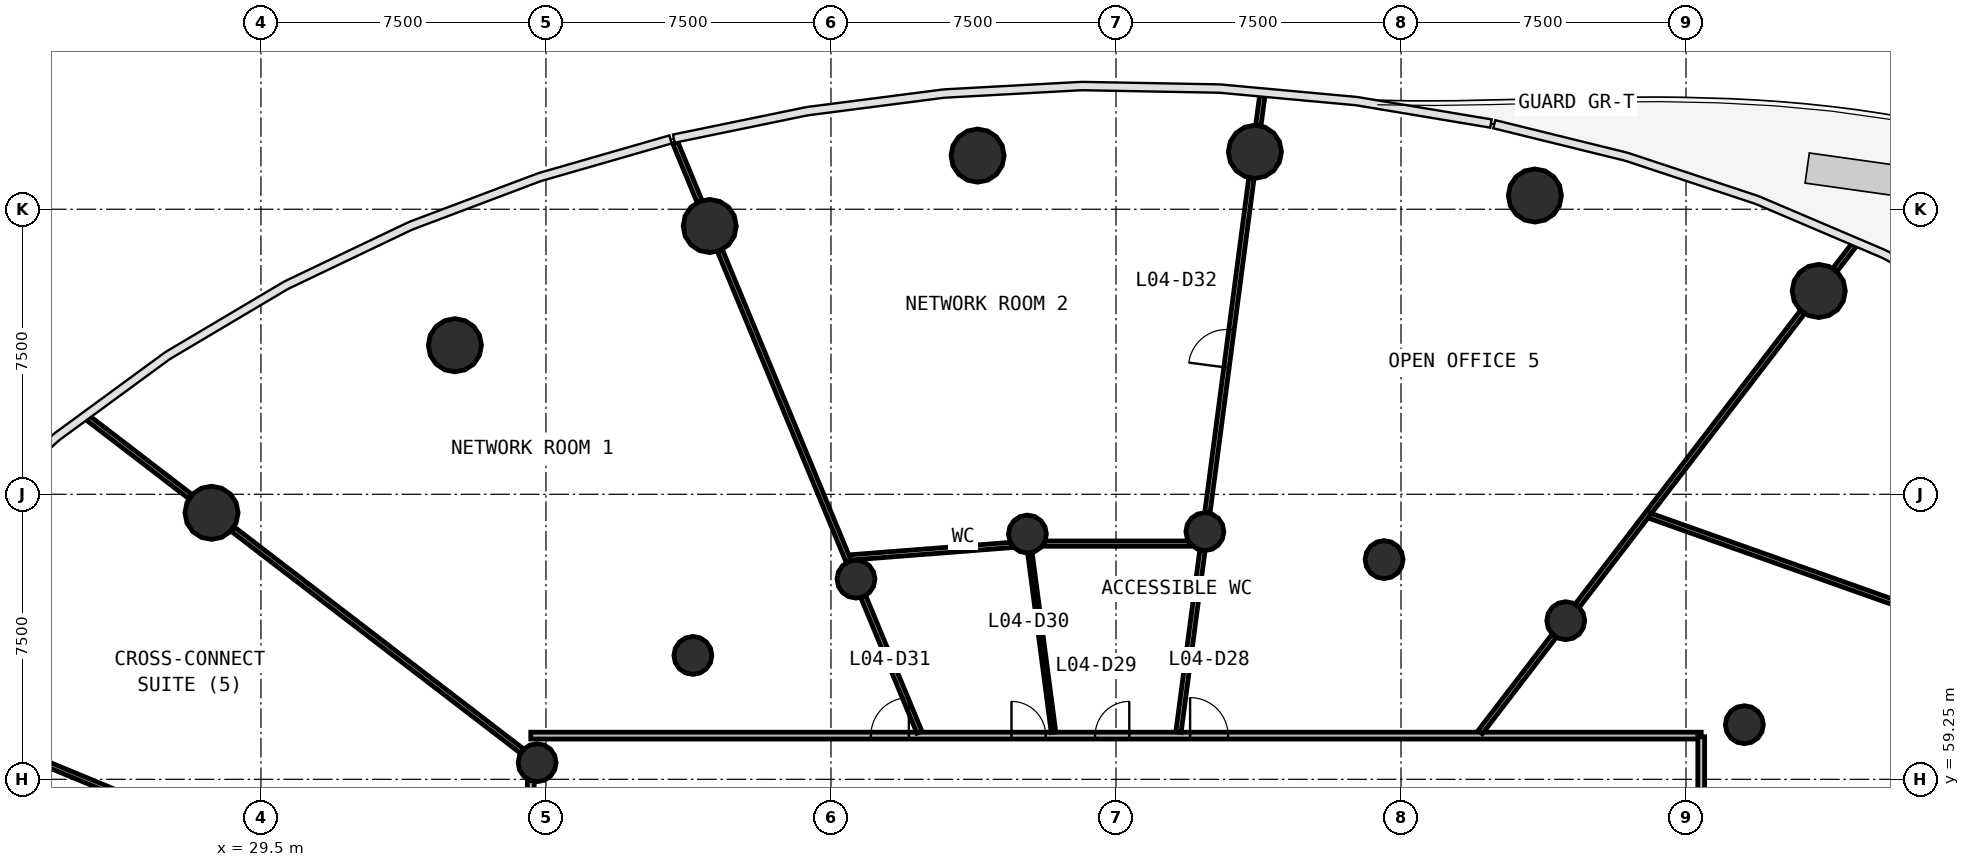
"""IFC4 building model, lengths in metres.
Left out: names, types, materials, properties, quantities, classifications, styles, units other than length and angle.
Written with IfcOpenShell. Run it as: python <this file> out.ifc"""

import sys

from ifc_helpers import new_model, si_unit, direction, frame, frame_2d, origin, origin_2d, place, context, subcontext, project, spatial, rectangle, circle, extrude, source, transform, mapped, element, fill, save


model = new_model("IFC4")
c1 = context("Model", 3, precision=1e-05, world=origin(), true_north=direction((0.0, 1.0)))
c2 = subcontext(c1, "Body", "Model", "MODEL_VIEW")
j1 = project(units=[si_unit("LENGTHUNIT", "METRE"), si_unit("PLANEANGLEUNIT", "RADIAN")], contexts=[c1])
p1 = place(None, origin())
s1 = spatial("IfcSite", under=j1, at=p1, CompositionType="ELEMENT")
p2 = place(p1, origin())
s2 = spatial("IfcBuilding", under=s1, at=p2, CompositionType="ELEMENT")
p3 = place(p2, frame((0.0, 0.0, 18.2)))
s3 = spatial("IfcBuildingStorey", under=s2, at=p3, CompositionType="ELEMENT", Elevation=18.2)
m1 = source(origin(), c2, "Body", "SweptSolid", [
    extrude(circle(Radius=0.7, at=origin_2d()), origin(), (0.0, 0.0, 1.0), 4.4),
])
for number, where, z_axis, x_axis in (
    (1, (70.492, 72.1, 0.0), (0.0, 0.0, 1.0), (1.0, 0.0, 0.0)),
    (2, (63.023, 74.611, 0.0), (0.0, 0.0, 1.0), (1.0, 0.0, 0.0)),
    (3, (55.655, 75.761, 0.0), (0.0, 0.0, 1.0), (1.0, 0.0, 0.0)),
    (4, (48.358, 75.661, 0.0), (0.0, 0.0, 1.0), (1.0, 0.0, 0.0)),
    (5, (41.31, 73.809, 0.0), (0.0, 0.0, 1.0), (1.0, 0.0, 0.0)),
    (6, (34.604, 70.672, 0.0), (0.0, 0.0, 1.0), (1.0, 0.0, 0.0)),
    (7, (28.199, 66.263, 0.0), (0.0, 0.0, 1.0), (1.0, 0.0, 0.0)),
):
    element("IfcColumn", number, at=place(p3, frame(where, z_axis=z_axis, x_axis=x_axis)), inside=s3, PredefinedType="COLUMN", context=c2, shape_type="MappedRepresentation", body=[
        mapped(m1, transform((0.0, 0.0, 0.0), scale=1.0)),
    ])
m2 = source(origin(), c2, "Body", "SweptSolid", [
    extrude(circle(Radius=0.5, at=origin_2d()), origin(), (0.0, 0.0, 1.0), 4.4),
])
for number, where, z_axis, x_axis in (
    (8, (68.535, 60.688, 0.0), (0.0, 0.0, 1.0), (1.0, 0.0, 0.0)),
    (9, (63.835, 63.424, 0.0), (0.0, 0.0, 1.0), (1.0, 0.0, 0.0)),
    (10, (59.055, 65.031, 0.0), (0.0, 0.0, 1.0), (1.0, 0.0, 0.0)),
    (11, (54.339, 65.767, 0.0), (0.0, 0.0, 1.0), (1.0, 0.0, 0.0)),
    (12, (49.669, 65.703, 0.0), (0.0, 0.0, 1.0), (1.0, 0.0, 0.0)),
    (13, (45.158, 64.518, 0.0), (0.0, 0.0, 1.0), (1.0, 0.0, 0.0)),
    (14, (40.866, 62.51, 0.0), (0.0, 0.0, 1.0), (1.0, 0.0, 0.0)),
    (15, (36.768, 59.688, 0.0), (0.0, 0.0, 1.0), (1.0, 0.0, 0.0)),
):
    element("IfcColumn", number, at=place(p3, frame(where, z_axis=z_axis, x_axis=x_axis)), inside=s3, PredefinedType="COLUMN", context=c2, shape_type="MappedRepresentation", body=[
        mapped(m2, transform((0.0, 0.0, 0.0), scale=1.0)),
    ])
p4 = place(p3, frame((36.6, 60.4, 0.0), z_axis=(0.0, 0.0, 1.0), x_axis=(1.0, 0.0, 0.0)))
e16 = element("IfcWall", 16, at=p4, inside=s3, PredefinedType="PARTITIONING", context=c2, shape_type="SweptSolid", body=[
    extrude(rectangle(XDim=30.8, YDim=0.18, at=frame_2d((15.4, 0.0))), origin(), (0.0, 0.0, 1.0), 3.15),
])
p5 = place(p4, frame((17.35, 0.0, 0.0)))
e17 = element("IfcOpeningElement", 17, at=p5, cuts=e16, PredefinedType="OPENING", context=c2, shape_type="SweptSolid", body=[
    extrude(rectangle(XDim=1.0, YDim=2.1, at=frame_2d((0.5, 1.05))), frame((0.0, 0.1, 0.0), z_axis=(0.0, -1.0, 0.0), x_axis=(1.0, 0.0, 0.0)), (0.0, 0.0, 1.0), 0.2),
])
p6 = place(p4, frame((14.85, 0.0, 0.0)))
e18 = element("IfcOpeningElement", 18, at=p6, cuts=e16, PredefinedType="OPENING", context=c2, shape_type="SweptSolid", body=[
    extrude(rectangle(XDim=0.9, YDim=2.1, at=frame_2d((0.45, 1.05))), frame((0.0, 0.1, 0.0), z_axis=(0.0, -1.0, 0.0), x_axis=(1.0, 0.0, 0.0)), (0.0, 0.0, 1.0), 0.2),
])
p7 = place(p4, frame((12.65, 0.0, 0.0)))
e19 = element("IfcOpeningElement", 19, at=p7, cuts=e16, PredefinedType="OPENING", context=c2, shape_type="SweptSolid", body=[
    extrude(rectangle(XDim=0.9, YDim=2.1, at=frame_2d((0.45, 1.05))), frame((0.0, 0.1, 0.0), z_axis=(0.0, -1.0, 0.0), x_axis=(1.0, 0.0, 0.0)), (0.0, 0.0, 1.0), 0.2),
])
p8 = place(p4, frame((8.95, 0.0, 0.0)))
e20 = element("IfcOpeningElement", 20, at=p8, cuts=e16, PredefinedType="OPENING", context=c2, shape_type="SweptSolid", body=[
    extrude(rectangle(XDim=1.0, YDim=2.1, at=frame_2d((0.5, 1.05))), frame((0.0, 0.1, 0.0), z_axis=(0.0, -1.0, 0.0), x_axis=(1.0, 0.0, 0.0)), (0.0, 0.0, 1.0), 0.2),
])
p9 = place(p3, frame((67.4, 60.37, 0.0), z_axis=(0.0, 0.0, 1.0), x_axis=(0.0, -1.0, 0.0)))
e21 = element("IfcWall", 21, at=p9, inside=s3, PredefinedType="PARTITIONING", context=c2, shape_type="SweptSolid", body=[
    extrude(rectangle(XDim=23.583, YDim=0.18, at=frame_2d((11.791, 0.0))), origin(), (0.0, 0.0, 1.0), 3.15),
])
p10 = place(p9, frame((11.333, 0.0, 0.0)))
e22 = element("IfcOpeningElement", 22, at=p10, cuts=e21, PredefinedType="OPENING", context=c2, shape_type="SweptSolid", body=[
    extrude(rectangle(XDim=1.0, YDim=2.1, at=frame_2d((0.5, 1.05))), frame((0.0, 0.1, 0.0), z_axis=(0.0, -1.0, 0.0), x_axis=(1.0, 0.0, 0.0)), (0.0, 0.0, 1.0), 0.2),
])
p11 = place(p9, frame((4.532, 0.0, 0.0)))
e23 = element("IfcOpeningElement", 23, at=p11, cuts=e21, PredefinedType="OPENING", context=c2, shape_type="SweptSolid", body=[
    extrude(rectangle(XDim=1.0, YDim=2.1, at=frame_2d((0.5, 1.05))), frame((0.0, 0.1, 0.0), z_axis=(0.0, -1.0, 0.0), x_axis=(1.0, 0.0, 0.0)), (0.0, 0.0, 1.0), 0.2),
])
p12 = place(p3, frame((36.6, 35.63, 0.0), z_axis=(0.0, 0.0, 1.0), x_axis=(0.0, 1.0, 0.0)))
e24 = element("IfcWall", 24, at=p12, inside=s3, PredefinedType="PARTITIONING", context=c2, shape_type="SweptSolid", body=[
    extrude(rectangle(XDim=23.583, YDim=0.18, at=frame_2d((11.791, 0.0))), origin(), (0.0, 0.0, 1.0), 3.15),
])
p13 = place(p12, frame((19.133, 0.0, 0.0)))
e25 = element("IfcOpeningElement", 25, at=p13, cuts=e24, PredefinedType="OPENING", context=c2, shape_type="SweptSolid", body=[
    extrude(rectangle(XDim=1.0, YDim=2.1, at=frame_2d((0.5, 1.05))), frame((0.0, 0.1, 0.0), z_axis=(0.0, -1.0, 0.0), x_axis=(1.0, 0.0, 0.0)), (0.0, 0.0, 1.0), 0.2),
])
p14 = place(p12, frame((11.333, 0.0, 0.0)))
e26 = element("IfcOpeningElement", 26, at=p14, cuts=e24, PredefinedType="OPENING", context=c2, shape_type="SweptSolid", body=[
    extrude(rectangle(XDim=1.0, YDim=2.1, at=frame_2d((0.5, 1.05))), frame((0.0, 0.1, 0.0), z_axis=(0.0, -1.0, 0.0), x_axis=(1.0, 0.0, 0.0)), (0.0, 0.0, 1.0), 0.2),
])
p15 = place(p3, frame((70.064, 71.541, 0.0), z_axis=(0.0, 0.0, 1.0), x_axis=(-0.608770295053, -0.793346537057, 0.0)))
e27 = element("IfcWall", 27, at=p15, inside=s3, PredefinedType="PARTITIONING", context=c2, shape_type="SweptSolid", body=[
    extrude(rectangle(XDim=9.727, YDim=0.14, at=frame_2d((4.864, 0.0))), origin(), (0.0, 0.0, 1.0), 3.15),
])
p16 = place(p3, frame((36.367, 59.995, 0.0), z_axis=(0.0, 0.0, 1.0), x_axis=(-0.793366218398, 0.608744645566, 0.0)))
e28 = element("IfcWall", 28, at=p16, inside=s3, PredefinedType="PARTITIONING", context=c2, shape_type="SweptSolid", body=[
    extrude(rectangle(XDim=9.591, YDim=0.14, at=frame_2d((4.796, 0.0))), origin(), (0.0, 0.0, 1.0), 3.15),
])
p17 = place(p3, frame((54.405, 66.267, 0.0), z_axis=(0.0, 0.0, 1.0), x_axis=(0.130521426482, 0.991445488783, 0.0)))
e29 = element("IfcWall", 29, at=p17, inside=s3, PredefinedType="PARTITIONING", context=c2, shape_type="SweptSolid", body=[
    extrude(rectangle(XDim=8.872, YDim=0.14, at=frame_2d((4.436, 0.0))), origin(), (0.0, 0.0, 1.0), 3.15),
])
p18 = place(p17, frame((3.85, 0.0, 0.0)))
e30 = element("IfcOpeningElement", 30, at=p18, cuts=e29, PredefinedType="OPENING", context=c2, shape_type="SweptSolid", body=[
    extrude(rectangle(XDim=1.0, YDim=2.1, at=frame_2d((0.5, 1.05))), frame((0.0, 0.08, 0.0), z_axis=(0.0, -1.0, 0.0), x_axis=(1.0, 0.0, 0.0)), (0.0, 0.0, 1.0), 0.16),
])
p19 = place(p3, frame((41.58, 73.157, 0.0), z_axis=(0.0, 0.0, 1.0), x_axis=(0.382692208588, -0.923875897232, 0.0)))
e31 = element("IfcWall", 31, at=p19, inside=s3, PredefinedType="PARTITIONING", context=c2, shape_type="SweptSolid", body=[
    extrude(rectangle(XDim=8.846, YDim=0.14, at=frame_2d((4.423, 0.0))), origin(), (0.0, 0.0, 1.0), 3.15),
])
p20 = place(p3, frame((72.647, 63.843, 0.0), z_axis=(0.0, 0.0, 1.0), x_axis=(-0.942402239282, 0.33448171758, 0.0)))
e32 = element("IfcWall", 32, at=p20, inside=s3, PredefinedType="PARTITIONING", context=c2, shape_type="SweptSolid", body=[
    extrude(rectangle(XDim=7.007, YDim=0.14, at=frame_2d((3.503, 0.0))), origin(), (0.0, 0.0, 1.0), 3.15),
])
p21 = place(p3, frame((53.644, 60.49, 0.0), z_axis=(0.0, 0.0, 1.0), x_axis=(0.130523979823, 0.991445152639, 0.0)))
e33 = element("IfcWall", 33, at=p21, inside=s3, PredefinedType="PARTITIONING", context=c2, shape_type="SweptSolid", body=[
    extrude(rectangle(XDim=4.818, YDim=0.14, at=frame_2d((2.409, 0.0))), origin(), (0.0, 0.0, 1.0), 3.15),
])
p22 = place(p3, frame((27.077, 58.323, 0.0), z_axis=(0.0, 0.0, 1.0), x_axis=(-0.923858763081, 0.382733570356, 0.0)))
e34 = element("IfcWall", 34, at=p22, inside=s3, PredefinedType="PARTITIONING", context=c2, shape_type="SweptSolid", body=[
    extrude(rectangle(XDim=4.405, YDim=0.14, at=frame_2d((2.203, 0.0))), origin(), (0.0, 0.0, 1.0), 3.15),
])
p23 = place(p3, frame((49.253, 65.417, 0.0), z_axis=(0.0, 0.0, 1.0), x_axis=(-0.99700515582, -0.077335110193, 0.0)))
e35 = element("IfcWall", 35, at=p23, inside=s3, PredefinedType="PARTITIONING", context=c2, shape_type="SweptSolid", body=[
    extrude(rectangle(XDim=4.268, YDim=0.14, at=frame_2d((2.134, 0.0))), origin(), (0.0, 0.0, 1.0), 3.15),
])
p24 = place(p3, frame((46.826, 60.49, 0.0), z_axis=(0.0, 0.0, 1.0), x_axis=(-0.382644558062, 0.923895633817, 0.0)))
e36 = element("IfcWall", 36, at=p24, inside=s3, PredefinedType="PARTITIONING", context=c2, shape_type="SweptSolid", body=[
    extrude(rectangle(XDim=3.854, YDim=0.14, at=frame_2d((1.927, 0.0))), origin(), (0.0, 0.0, 1.0), 3.15),
])
p25 = place(p3, frame((53.945, 65.452, 0.0), z_axis=(0.0, 0.0, 1.0), x_axis=(-1.0, 0.0, 0.0)))
e37 = element("IfcWall", 37, at=p25, inside=s3, PredefinedType="PARTITIONING", context=c2, shape_type="SweptSolid", body=[
    extrude(rectangle(XDim=3.838, YDim=0.14, at=frame_2d((1.919, 0.0))), origin(), (0.0, 0.0, 1.0), 3.15),
])
p26 = place(p3, frame((27.641, 66.691, 0.0), z_axis=(0.0, 0.0, 1.0), x_axis=(-0.793324630829, 0.608798842082, 0.0)))
e38 = element("IfcWall", 38, at=p26, inside=s3, PredefinedType="PARTITIONING", context=c2, shape_type="SweptSolid", body=[
    extrude(rectangle(XDim=3.404, YDim=0.14, at=frame_2d((1.702, 0.0))), origin(), (0.0, 0.0, 1.0), 3.15),
])
p27 = place(p3, frame((61.584, 60.49, 0.0), z_axis=(0.0, 0.0, 1.0), x_axis=(0.60874605662, 0.793365135703, 0.0)))
e39 = element("IfcWall", 39, at=p27, inside=s3, PredefinedType="PARTITIONING", context=c2, shape_type="SweptSolid", body=[
    extrude(rectangle(XDim=3.194, YDim=0.14, at=frame_2d((1.597, 0.0))), origin(), (0.0, 0.0, 1.0), 3.15),
])
p28 = place(p3, frame((41.04, 74.46, 0.0), z_axis=(0.0, 0.0, 1.0), x_axis=(-0.382571117301, 0.923926046936, 0.0)))
e40 = element("IfcWall", 40, at=p28, inside=s3, PredefinedType="PARTITIONING", context=c2, shape_type="SweptSolid", body=[
    extrude(rectangle(XDim=1.671, YDim=0.14, at=frame_2d((0.836, 0.0))), origin(), (0.0, 0.0, 1.0), 3.15),
])
p29 = place(p3, frame((70.921, 72.658, 0.0), z_axis=(0.0, 0.0, 1.0), x_axis=(0.608939798959, 0.793216440351, 0.0)))
e41 = element("IfcWall", 41, at=p29, inside=s3, PredefinedType="PARTITIONING", context=c2, shape_type="SweptSolid", body=[
    extrude(rectangle(XDim=0.827, YDim=0.14, at=frame_2d((0.413, 0.0))), origin(), (0.0, 0.0, 1.0), 3.15),
])
p30 = place(p3, frame((55.747, 76.46, 0.0), z_axis=(0.0, 0.0, 1.0), x_axis=(0.130639131193, 0.991429986132, 0.0)))
e42 = element("IfcWall", 42, at=p30, inside=s3, PredefinedType="PARTITIONING", context=c2, shape_type="SweptSolid", body=[
    extrude(rectangle(XDim=0.787, YDim=0.14, at=frame_2d((0.394, 0.0))), origin(), (0.0, 0.0, 1.0), 3.15),
])
p31 = place(p3, frame((50.356, 60.49, 0.0), z_axis=(0.0, 0.0, 1.0), x_axis=(-0.130548834981, 0.991441880135, 0.0)))
e43 = element("IfcWall", 43, at=p31, inside=s3, PredefinedType="PARTITIONING", context=c2, shape_type="SweptSolid", body=[
    extrude(rectangle(XDim=4.754, YDim=0.12, at=frame_2d((2.377, 0.0))), origin(), (0.0, 0.0, 1.0), 3.15),
])
m3 = source(origin(), c2, "Body", "SweptSolid", [
    extrude(rectangle(XDim=1.0, YDim=2.1, at=frame_2d((0.5, 1.05))), frame((0.0, 0.025, 0.0), z_axis=(0.0, -1.0, 0.0), x_axis=(1.0, 0.0, 0.0)), (0.0, 0.0, 1.0), 0.05),
])
p32 = place(p5, origin())
e44 = element("IfcDoor", 44, at=p32, inside=s3, OperationType="SINGLE_SWING_LEFT", PredefinedType="DOOR", context=c2, shape_type="MappedRepresentation", body=[
    mapped(m3, transform((0.0, 0.0, 0.0), scale=1.0)),
])
fill(e17, e44)
m4 = source(origin(), c2, "Body", "SweptSolid", [
    extrude(rectangle(XDim=0.9, YDim=2.1, at=frame_2d((0.45, 1.05))), frame((0.0, 0.025, 0.0), z_axis=(0.0, -1.0, 0.0), x_axis=(1.0, 0.0, 0.0)), (0.0, 0.0, 1.0), 0.05),
])
p33 = place(p6, origin())
e45 = element("IfcDoor", 45, at=p33, inside=s3, OperationType="SINGLE_SWING_RIGHT", PredefinedType="DOOR", context=c2, shape_type="MappedRepresentation", body=[
    mapped(m4, transform((0.0, 0.0, 0.0), scale=1.0)),
])
fill(e18, e45)
p34 = place(p7, origin())
e46 = element("IfcDoor", 46, at=p34, inside=s3, OperationType="SINGLE_SWING_LEFT", PredefinedType="DOOR", context=c2, shape_type="MappedRepresentation", body=[
    mapped(m4, transform((0.0, 0.0, 0.0), scale=1.0)),
])
fill(e19, e46)
p35 = place(p8, origin())
e47 = element("IfcDoor", 47, at=p35, inside=s3, OperationType="SINGLE_SWING_RIGHT", PredefinedType="DOOR", context=c2, shape_type="MappedRepresentation", body=[
    mapped(m3, transform((0.0, 0.0, 0.0), scale=1.0)),
])
fill(e20, e47)
p36 = place(p18, origin())
e48 = element("IfcDoor", 48, at=p36, inside=s3, OperationType="SINGLE_SWING_LEFT", PredefinedType="DOOR", context=c2, shape_type="MappedRepresentation", body=[
    mapped(m3, transform((0.0, 0.0, 0.0), scale=1.0)),
])
fill(e30, e48)
save(model, sys.argv[1])
